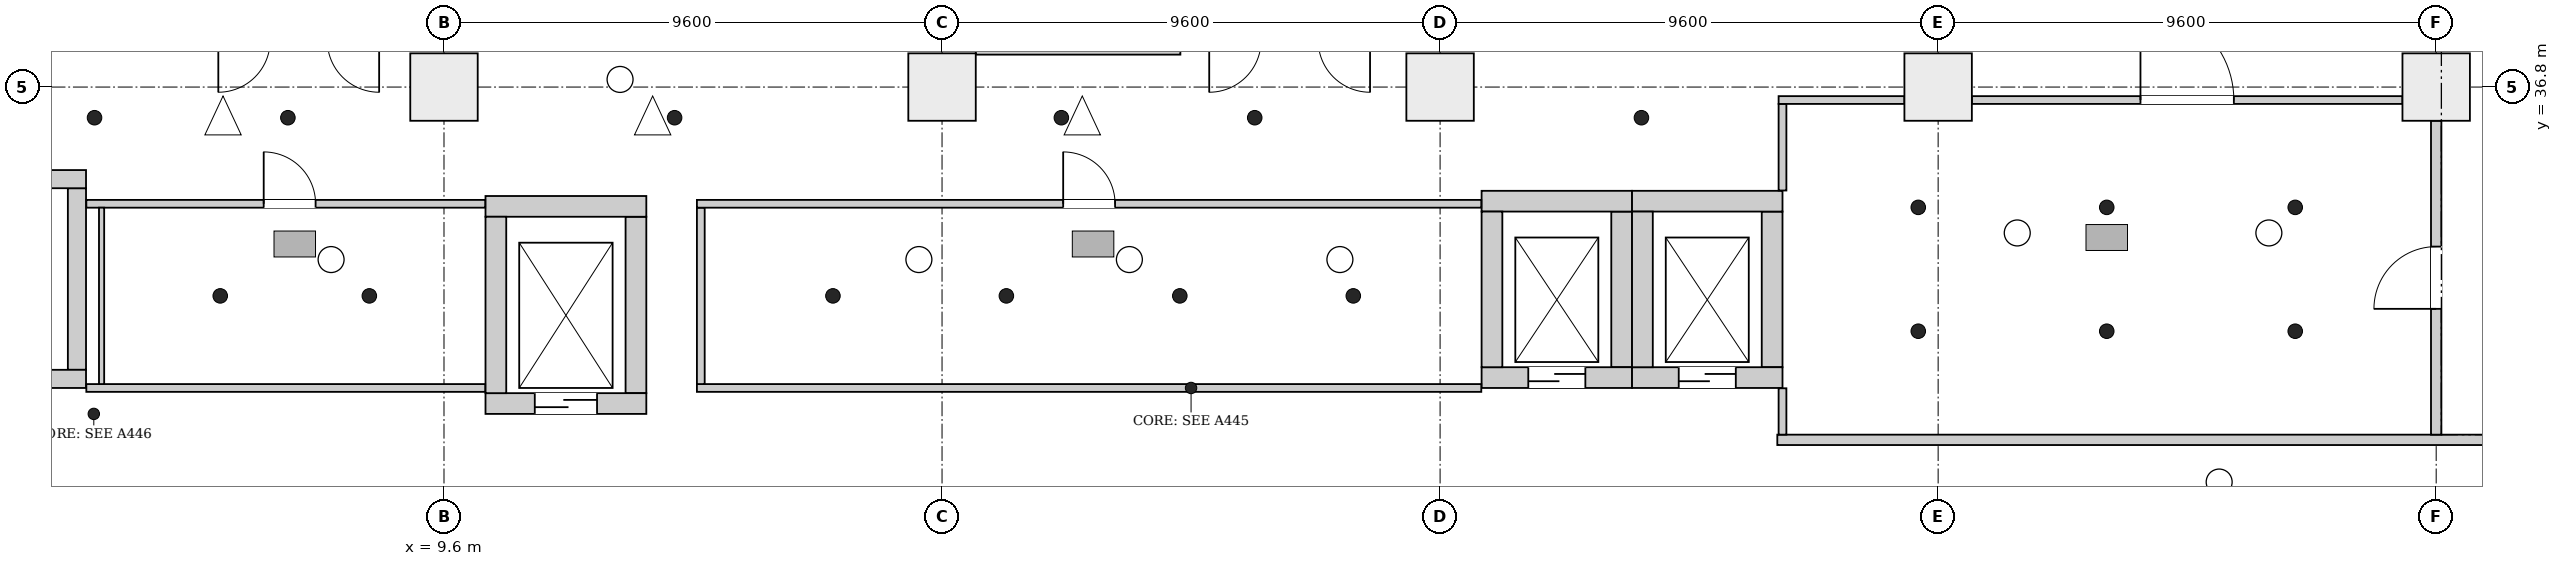
"""IFC4 building model, lengths in metres.
Left out: names, types, materials, properties, quantities, classifications, styles, units other than length and angle.
Written with IfcOpenShell. Run it as: python <this file> out.ifc"""

import sys

from ifc_helpers import new_model, si_unit, direction, frame, frame_2d, origin, origin_2d, place, context, subcontext, project, spatial, rectangle, extrude, element, fill, save


model = new_model("IFC4")
c1 = context("Model", 3, precision=1e-05, world=origin(), true_north=direction((0.0, 1.0)))
c2 = subcontext(c1, "Body", "Model", "MODEL_VIEW")
j1 = project(units=[si_unit("LENGTHUNIT", "METRE"), si_unit("PLANEANGLEUNIT", "RADIAN")], contexts=[c1])
p1 = place(None, origin())
s1 = spatial("IfcSite", under=j1, at=p1, CompositionType="ELEMENT")
p2 = place(p1, origin())
s2 = spatial("IfcBuilding", under=s1, at=p2, CompositionType="ELEMENT")
p3 = place(p2, origin())
s3 = spatial("IfcBuildingStorey", under=s2, at=p3, CompositionType="ELEMENT", Elevation=0.0)
for number, where, z_axis, x_axis in (
    (1, (0.2, 31.175, 0.0), (0.0, 0.0, 1.0), (1.0, 0.0, 0.0)),
    (2, (0.2, 35.025, 0.0), (0.0, 0.0, 1.0), (1.0, 0.0, 0.0)),
):
    element("IfcWall", number, at=place(p3, frame(where, z_axis=z_axis, x_axis=x_axis)), inside=s3, PredefinedType="SHEAR", context=c2, shape_type="SweptSolid", body=[
        extrude(rectangle(XDim=2.5, YDim=0.35, at=frame_2d((1.25, 0.0))), origin(), (0.0, 0.0, 1.0), 6.5),
    ])
p4 = place(p3, frame((2.525, 31.35, 0.0), z_axis=(0.0, 0.0, 1.0), x_axis=(0.0, 1.0, 0.0)))
e3 = element("IfcWall", 3, at=p4, inside=s3, PredefinedType="SHEAR", context=c2, shape_type="SweptSolid", body=[
    extrude(rectangle(XDim=3.5, YDim=0.35, at=frame_2d((1.75, 0.0))), origin(), (0.0, 0.0, 1.0), 6.5),
])
p5 = place(p3, frame((10.4, 30.7, 0.0), z_axis=(0.0, 0.0, 1.0), x_axis=(1.0, 0.0, 0.0)))
e4 = element("IfcWall", 4, at=p5, inside=s3, PredefinedType="SHEAR", context=c2, shape_type="SweptSolid", body=[
    extrude(rectangle(XDim=3.1, YDim=0.4, at=frame_2d((1.55, 0.0))), origin(), (0.0, 0.0, 1.0), 6.5),
])
p6 = place(p5, frame((0.95, 0.0, 0.0)))
e5 = element("IfcOpeningElement", 5, at=p6, cuts=e4, PredefinedType="OPENING", context=c2, shape_type="SweptSolid", body=[
    extrude(rectangle(XDim=1.2, YDim=2.1, at=frame_2d((0.6, 1.05))), frame((0.0, 0.21, 0.0), z_axis=(0.0, -1.0, 0.0), x_axis=(1.0, 0.0, 0.0)), (0.0, 0.0, 1.0), 0.42),
])
p7 = place(p3, frame((10.4, 34.5, 0.0), z_axis=(0.0, 0.0, 1.0), x_axis=(1.0, 0.0, 0.0)))
e6 = element("IfcWall", 6, at=p7, inside=s3, PredefinedType="SHEAR", context=c2, shape_type="SweptSolid", body=[
    extrude(rectangle(XDim=3.1, YDim=0.4, at=frame_2d((1.55, 0.0))), origin(), (0.0, 0.0, 1.0), 6.5),
])
for number, where, z_axis, x_axis in (
    (7, (10.6, 30.9, 0.0), (0.0, 0.0, 1.0), (0.0, 1.0, 0.0)),
    (8, (13.3, 30.9, 0.0), (0.0, 0.0, 1.0), (0.0, 1.0, 0.0)),
):
    element("IfcWall", number, at=place(p3, frame(where, z_axis=z_axis, x_axis=x_axis)), inside=s3, PredefinedType="SHEAR", context=c2, shape_type="SweptSolid", body=[
        extrude(rectangle(XDim=3.4, YDim=0.4, at=frame_2d((1.7, 0.0))), origin(), (0.0, 0.0, 1.0), 6.5),
    ])
p8 = place(p3, frame((29.6, 31.2, 0.0), z_axis=(0.0, 0.0, 1.0), x_axis=(1.0, 0.0, 0.0)))
e9 = element("IfcWall", 9, at=p8, inside=s3, PredefinedType="SHEAR", context=c2, shape_type="SweptSolid", body=[
    extrude(rectangle(XDim=2.9, YDim=0.4, at=frame_2d((1.45, 0.0))), origin(), (0.0, 0.0, 1.0), 6.5),
])
p9 = place(p8, frame((0.9, 0.0, 0.0)))
e10 = element("IfcOpeningElement", 10, at=p9, cuts=e9, PredefinedType="OPENING", context=c2, shape_type="SweptSolid", body=[
    extrude(rectangle(XDim=1.1, YDim=2.1, at=frame_2d((0.55, 1.05))), frame((0.0, 0.21, 0.0), z_axis=(0.0, -1.0, 0.0), x_axis=(1.0, 0.0, 0.0)), (0.0, 0.0, 1.0), 0.42),
])
p10 = place(p3, frame((29.6, 34.6, 0.0), z_axis=(0.0, 0.0, 1.0), x_axis=(1.0, 0.0, 0.0)))
e11 = element("IfcWall", 11, at=p10, inside=s3, PredefinedType="SHEAR", context=c2, shape_type="SweptSolid", body=[
    extrude(rectangle(XDim=2.9, YDim=0.4, at=frame_2d((1.45, 0.0))), origin(), (0.0, 0.0, 1.0), 6.5),
])
for number, where, z_axis, x_axis in (
    (12, (29.8, 31.4, 0.0), (0.0, 0.0, 1.0), (0.0, 1.0, 0.0)),
    (13, (32.3, 31.4, 0.0), (0.0, 0.0, 1.0), (0.0, 1.0, 0.0)),
):
    element("IfcWall", number, at=place(p3, frame(where, z_axis=z_axis, x_axis=x_axis)), inside=s3, PredefinedType="SHEAR", context=c2, shape_type="SweptSolid", body=[
        extrude(rectangle(XDim=3.0, YDim=0.4, at=frame_2d((1.5, 0.0))), origin(), (0.0, 0.0, 1.0), 6.5),
    ])
p11 = place(p3, frame((32.5, 31.2, 0.0), z_axis=(0.0, 0.0, 1.0), x_axis=(1.0, 0.0, 0.0)))
e14 = element("IfcWall", 14, at=p11, inside=s3, PredefinedType="SHEAR", context=c2, shape_type="SweptSolid", body=[
    extrude(rectangle(XDim=2.9, YDim=0.4, at=frame_2d((1.45, 0.0))), origin(), (0.0, 0.0, 1.0), 6.5),
])
p12 = place(p11, frame((0.9, 0.0, 0.0)))
e15 = element("IfcOpeningElement", 15, at=p12, cuts=e14, PredefinedType="OPENING", context=c2, shape_type="SweptSolid", body=[
    extrude(rectangle(XDim=1.1, YDim=2.1, at=frame_2d((0.55, 1.05))), frame((0.0, 0.21, 0.0), z_axis=(0.0, -1.0, 0.0), x_axis=(1.0, 0.0, 0.0)), (0.0, 0.0, 1.0), 0.42),
])
p13 = place(p3, frame((32.5, 34.6, 0.0), z_axis=(0.0, 0.0, 1.0), x_axis=(1.0, 0.0, 0.0)))
e16 = element("IfcWall", 16, at=p13, inside=s3, PredefinedType="SHEAR", context=c2, shape_type="SweptSolid", body=[
    extrude(rectangle(XDim=2.9, YDim=0.4, at=frame_2d((1.45, 0.0))), origin(), (0.0, 0.0, 1.0), 6.5),
])
for number, where, z_axis, x_axis in (
    (17, (32.7, 31.4, 0.0), (0.0, 0.0, 1.0), (0.0, 1.0, 0.0)),
    (18, (35.2, 31.4, 0.0), (0.0, 0.0, 1.0), (0.0, 1.0, 0.0)),
):
    element("IfcWall", number, at=place(p3, frame(where, z_axis=z_axis, x_axis=x_axis)), inside=s3, PredefinedType="SHEAR", context=c2, shape_type="SweptSolid", body=[
        extrude(rectangle(XDim=3.0, YDim=0.4, at=frame_2d((1.5, 0.0))), origin(), (0.0, 0.0, 1.0), 6.5),
    ])
for number, where, z_axis, x_axis in (
    (19, (9.6, 36.8, 0.0), (0.0, 0.0, 1.0), (1.0, 0.0, 0.0)),
    (20, (19.2, 36.8, 0.0), (0.0, 0.0, 1.0), (1.0, 0.0, 0.0)),
    (21, (28.8, 36.8, 0.0), (0.0, 0.0, 1.0), (1.0, 0.0, 0.0)),
    (22, (38.4, 36.8, 0.0), (0.0, 0.0, 1.0), (1.0, 0.0, 0.0)),
    (23, (48.0, 36.8, 0.0), (0.0, 0.0, 1.0), (1.0, 0.0, 0.0)),
):
    element("IfcColumn", number, at=place(p3, frame(where, z_axis=z_axis, x_axis=x_axis)), inside=s3, PredefinedType="COLUMN", context=c2, shape_type="SweptSolid", body=[
        extrude(rectangle(XDim=1.3, YDim=1.3, at=origin_2d()), origin(), (0.0, 0.0, 1.0), 6.5),
    ])
p14 = place(p3, frame((2.706, 31.0, 0.0), z_axis=(0.0, 0.0, 1.0), x_axis=(1.0, 0.0, 0.0)))
e24 = element("IfcWall", 24, at=p14, inside=s3, PredefinedType="PARTITIONING", context=c2, shape_type="SweptSolid", body=[
    extrude(rectangle(XDim=7.688, YDim=0.15, at=frame_2d((3.844, 0.0))), origin(), (0.0, 0.0, 1.0), 6.15),
])
p15 = place(p3, frame((2.706, 34.55, 0.0), z_axis=(0.0, 0.0, 1.0), x_axis=(1.0, 0.0, 0.0)))
e25 = element("IfcWall", 25, at=p15, inside=s3, PredefinedType="PARTITIONING", context=c2, shape_type="SweptSolid", body=[
    extrude(rectangle(XDim=7.688, YDim=0.15, at=frame_2d((3.844, 0.0))), origin(), (0.0, 0.0, 1.0), 6.15),
])
p16 = place(p15, frame((3.419, 0.0, 0.0)))
e26 = element("IfcOpeningElement", 26, at=p16, cuts=e25, PredefinedType="OPENING", context=c2, shape_type="SweptSolid", body=[
    extrude(rectangle(XDim=1.0, YDim=2.1, at=frame_2d((0.5, 1.05))), frame((0.0, 0.085, 0.0), z_axis=(0.0, -1.0, 0.0), x_axis=(1.0, 0.0, 0.0)), (0.0, 0.0, 1.0), 0.17),
])
p17 = place(p3, frame((3.0, 31.075, 0.0), z_axis=(0.0, 0.0, 1.0), x_axis=(0.0, 1.0, 0.0)))
e27 = element("IfcWall", 27, at=p17, inside=s3, PredefinedType="PARTITIONING", context=c2, shape_type="SweptSolid", body=[
    extrude(rectangle(XDim=3.4, YDim=0.1, at=frame_2d((1.7, 0.0))), origin(), (0.0, 0.0, 1.0), 6.15),
])
p18 = place(p3, frame((14.475, 31.0, 0.0), z_axis=(0.0, 0.0, 1.0), x_axis=(1.0, 0.0, 0.0)))
e28 = element("IfcWall", 28, at=p18, inside=s3, PredefinedType="PARTITIONING", context=c2, shape_type="SweptSolid", body=[
    extrude(rectangle(XDim=15.119, YDim=0.15, at=frame_2d((7.56, 0.0))), origin(), (0.0, 0.0, 1.0), 6.15),
])
p19 = place(p3, frame((14.55, 31.075, 0.0), z_axis=(0.0, 0.0, 1.0), x_axis=(0.0, 1.0, 0.0)))
e29 = element("IfcWall", 29, at=p19, inside=s3, PredefinedType="PARTITIONING", context=c2, shape_type="SweptSolid", body=[
    extrude(rectangle(XDim=3.4, YDim=0.15, at=frame_2d((1.7, 0.0))), origin(), (0.0, 0.0, 1.0), 6.15),
])
p20 = place(p3, frame((14.475, 34.55, 0.0), z_axis=(0.0, 0.0, 1.0), x_axis=(1.0, 0.0, 0.0)))
e30 = element("IfcWall", 30, at=p20, inside=s3, PredefinedType="PARTITIONING", context=c2, shape_type="SweptSolid", body=[
    extrude(rectangle(XDim=15.119, YDim=0.15, at=frame_2d((7.56, 0.0))), origin(), (0.0, 0.0, 1.0), 6.15),
])
p21 = place(p20, frame((7.06, 0.0, 0.0)))
e31 = element("IfcOpeningElement", 31, at=p21, cuts=e30, PredefinedType="OPENING", context=c2, shape_type="SweptSolid", body=[
    extrude(rectangle(XDim=1.0, YDim=2.1, at=frame_2d((0.5, 1.05))), frame((0.0, 0.085, 0.0), z_axis=(0.0, -1.0, 0.0), x_axis=(1.0, 0.0, 0.0)), (0.0, 0.0, 1.0), 0.17),
])
p22 = place(p3, frame((19.85, 37.5, 0.0), z_axis=(0.0, 0.0, 1.0), x_axis=(1.0, 0.0, 0.0)))
e32 = element("IfcWall", 32, at=p22, inside=s3, PredefinedType="PARTITIONING", context=c2, shape_type="SweptSolid", body=[
    extrude(rectangle(XDim=3.944, YDim=0.15, at=frame_2d((1.972, 0.0))), origin(), (0.0, 0.0, 1.0), 6.15),
])
p23 = place(p3, frame((35.3, 30.0, 0.0), z_axis=(0.0, 0.0, 1.0), x_axis=(1.0, 0.0, 0.0)))
e33 = element("IfcWall", 33, at=p23, inside=s3, PredefinedType="PARTITIONING", context=c2, shape_type="SweptSolid", body=[
    extrude(rectangle(XDim=22.094, YDim=0.2, at=frame_2d((11.047, 0.0))), origin(), (0.0, 0.0, 1.0), 6.15),
])
p24 = place(p3, frame((35.4, 30.1, 0.0), z_axis=(0.0, 0.0, 1.0), x_axis=(0.0, 1.0, 0.0)))
e34 = element("IfcWall", 34, at=p24, inside=s3, PredefinedType="PARTITIONING", context=c2, shape_type="SweptSolid", body=[
    extrude(rectangle(XDim=0.894, YDim=0.15, at=frame_2d((0.447, 0.0))), origin(), (0.0, 0.0, 1.0), 6.15),
])
p25 = place(p3, frame((35.4, 34.806, 0.0), z_axis=(0.0, 0.0, 1.0), x_axis=(0.0, 1.0, 0.0)))
e35 = element("IfcWall", 35, at=p25, inside=s3, PredefinedType="PARTITIONING", context=c2, shape_type="SweptSolid", body=[
    extrude(rectangle(XDim=1.669, YDim=0.15, at=frame_2d((0.834, 0.0))), origin(), (0.0, 0.0, 1.0), 6.15),
])
p26 = place(p3, frame((35.325, 36.55, 0.0), z_axis=(0.0, 0.0, 1.0), x_axis=(1.0, 0.0, 0.0)))
e36 = element("IfcWall", 36, at=p26, inside=s3, PredefinedType="PARTITIONING", context=c2, shape_type="SweptSolid", body=[
    extrude(rectangle(XDim=2.425, YDim=0.15, at=frame_2d((1.212, 0.0))), origin(), (0.0, 0.0, 1.0), 5.75),
])
p27 = place(p3, frame((39.05, 36.55, 0.0), z_axis=(0.0, 0.0, 1.0), x_axis=(1.0, 0.0, 0.0)))
e37 = element("IfcWall", 37, at=p27, inside=s3, PredefinedType="PARTITIONING", context=c2, shape_type="SweptSolid", body=[
    extrude(rectangle(XDim=8.3, YDim=0.15, at=frame_2d((4.15, 0.0))), origin(), (0.0, 0.0, 1.0), 5.75),
])
p28 = place(p27, frame((3.25, 0.0, 0.0)))
e38 = element("IfcOpeningElement", 38, at=p28, cuts=e37, PredefinedType="OPENING", context=c2, shape_type="SweptSolid", body=[
    extrude(rectangle(XDim=1.8, YDim=2.1, at=frame_2d((0.9, 1.05))), frame((0.0, 0.085, 0.0), z_axis=(0.0, -1.0, 0.0), x_axis=(1.0, 0.0, 0.0)), (0.0, 0.0, 1.0), 0.17),
])
p29 = place(p3, frame((48.0, 30.1, 0.0), z_axis=(0.0, 0.0, 1.0), x_axis=(0.0, 1.0, 0.0)))
e39 = element("IfcWall", 39, at=p29, inside=s3, PredefinedType="PARTITIONING", context=c2, shape_type="SweptSolid", body=[
    extrude(rectangle(XDim=6.05, YDim=0.2, at=frame_2d((3.025, 0.0))), origin(), (0.0, 0.0, 1.0), 5.75),
])
p30 = place(p29, frame((2.425, 0.0, 0.0)))
e40 = element("IfcOpeningElement", 40, at=p30, cuts=e39, PredefinedType="OPENING", context=c2, shape_type="SweptSolid", body=[
    extrude(rectangle(XDim=1.2, YDim=2.1, at=frame_2d((0.6, 1.05))), frame((0.0, 0.11, 0.0), z_axis=(0.0, -1.0, 0.0), x_axis=(1.0, 0.0, 0.0)), (0.0, 0.0, 1.0), 0.22),
])
p31 = place(p6, origin())
e41 = element("IfcDoor", 41, at=p31, inside=s3, OperationType="DOUBLE_DOOR_SLIDING", PredefinedType="DOOR", context=c2, shape_type="SweptSolid", body=[
    extrude(rectangle(XDim=1.2, YDim=2.1, at=frame_2d((0.6, 1.05))), frame((0.0, 0.025, 0.0), z_axis=(0.0, -1.0, 0.0), x_axis=(1.0, 0.0, 0.0)), (0.0, 0.0, 1.0), 0.05),
])
fill(e5, e41)
p32 = place(p9, origin())
e42 = element("IfcDoor", 42, at=p32, inside=s3, OperationType="DOUBLE_DOOR_SLIDING", PredefinedType="DOOR", context=c2, shape_type="SweptSolid", body=[
    extrude(rectangle(XDim=1.1, YDim=2.1, at=frame_2d((0.55, 1.05))), frame((0.0, 0.025, 0.0), z_axis=(0.0, -1.0, 0.0), x_axis=(1.0, 0.0, 0.0)), (0.0, 0.0, 1.0), 0.05),
])
fill(e10, e42)
p33 = place(p12, origin())
e43 = element("IfcDoor", 43, at=p33, inside=s3, OperationType="DOUBLE_DOOR_SLIDING", PredefinedType="DOOR", context=c2, shape_type="SweptSolid", body=[
    extrude(rectangle(XDim=1.1, YDim=2.1, at=frame_2d((0.55, 1.05))), frame((0.0, 0.025, 0.0), z_axis=(0.0, -1.0, 0.0), x_axis=(1.0, 0.0, 0.0)), (0.0, 0.0, 1.0), 0.05),
])
fill(e15, e43)
p34 = place(p21, origin())
e44 = element("IfcDoor", 44, at=p34, inside=s3, OperationType="SINGLE_SWING_LEFT", PredefinedType="DOOR", context=c2, shape_type="SweptSolid", body=[
    extrude(rectangle(XDim=1.0, YDim=2.1, at=frame_2d((0.5, 1.05))), frame((0.0, 0.025, 0.0), z_axis=(0.0, -1.0, 0.0), x_axis=(1.0, 0.0, 0.0)), (0.0, 0.0, 1.0), 0.05),
])
fill(e31, e44)
p35 = place(p16, origin())
e45 = element("IfcDoor", 45, at=p35, inside=s3, OperationType="SINGLE_SWING_LEFT", PredefinedType="DOOR", context=c2, shape_type="SweptSolid", body=[
    extrude(rectangle(XDim=1.0, YDim=2.1, at=frame_2d((0.5, 1.05))), frame((0.0, 0.025, 0.0), z_axis=(0.0, -1.0, 0.0), x_axis=(1.0, 0.0, 0.0)), (0.0, 0.0, 1.0), 0.05),
])
fill(e26, e45)
p36 = place(p28, origin())
e46 = element("IfcDoor", 46, at=p36, inside=s3, OperationType="DOUBLE_DOOR_SINGLE_SWING", PredefinedType="DOOR", context=c2, shape_type="SweptSolid", body=[
    extrude(rectangle(XDim=1.8, YDim=2.1, at=frame_2d((0.9, 1.05))), frame((0.0, 0.025, 0.0), z_axis=(0.0, -1.0, 0.0), x_axis=(1.0, 0.0, 0.0)), (0.0, 0.0, 1.0), 0.05),
])
fill(e38, e46)
p37 = place(p30, origin())
e47 = element("IfcDoor", 47, at=p37, inside=s3, OperationType="SINGLE_SWING_RIGHT", PredefinedType="DOOR", context=c2, shape_type="SweptSolid", body=[
    extrude(rectangle(XDim=1.2, YDim=2.1, at=frame_2d((0.6, 1.05))), frame((0.0, 0.025, 0.0), z_axis=(0.0, -1.0, 0.0), x_axis=(1.0, 0.0, 0.0)), (0.0, 0.0, 1.0), 0.05),
])
fill(e40, e47)
save(model, sys.argv[1])
